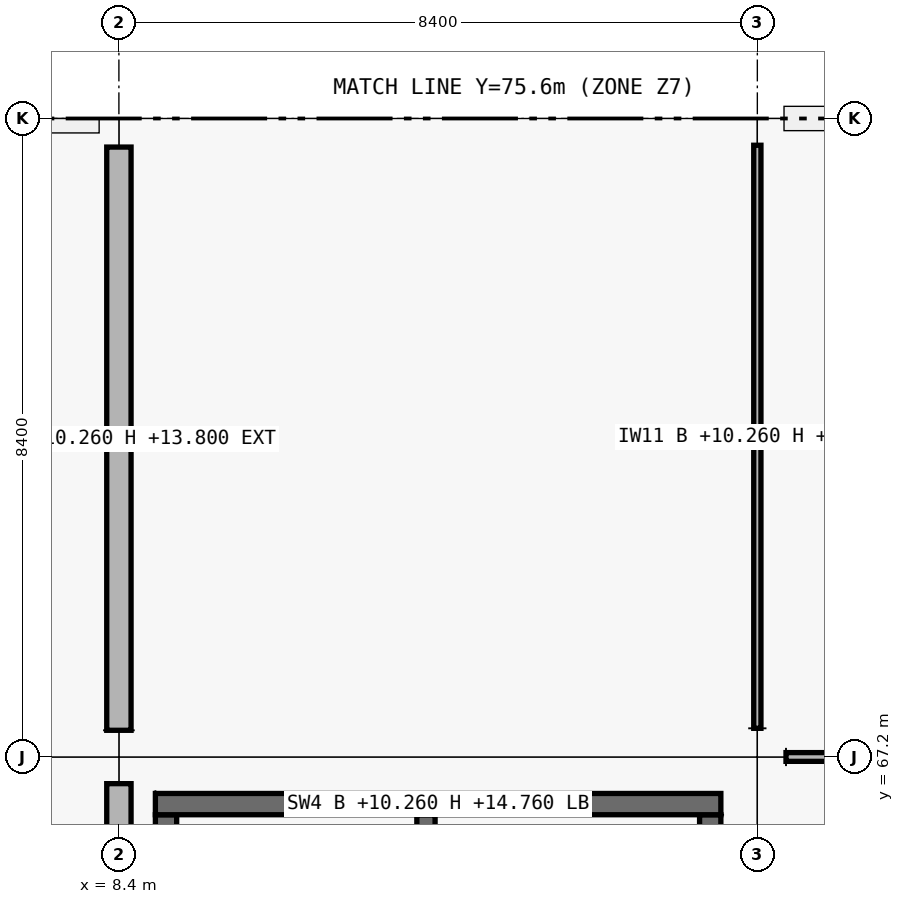
"""IFC4 building model, lengths in metres.
Left out: names, types, materials, properties, quantities, classifications, styles, units other than length and angle.
Written with IfcOpenShell. Run it as: python <this file> out.ifc"""

import sys

from ifc_helpers import new_model, si_unit, direction, frame, frame_2d, origin, origin_2d, place, context, subcontext, project, spatial, rectangle, extrude, element, fill, save


model = new_model("IFC4")
c1 = context("Model", 3, precision=1e-05, world=origin(), true_north=direction((0.0, 1.0)))
c2 = subcontext(c1, "Body", "Model", "MODEL_VIEW")
j1 = project(units=[si_unit("LENGTHUNIT", "METRE"), si_unit("PLANEANGLEUNIT", "RADIAN")], contexts=[c1])
p1 = place(None, origin())
s1 = spatial("IfcSite", under=j1, at=p1, CompositionType="ELEMENT")
p2 = place(p1, origin())
s2 = spatial("IfcBuilding", under=s1, at=p2, CompositionType="ELEMENT")
p3 = place(p2, frame((0.0, 0.0, 10.26)))
s3 = spatial("IfcBuildingStorey", under=s2, at=p3, CompositionType="ELEMENT", Elevation=10.26)
p4 = place(p3, frame((8.4, 67.2, 0.0), z_axis=(0.0, 0.0, 1.0), x_axis=(1.0, 0.0, 0.0)))
e1 = element("IfcColumn", 1, at=p4, inside=s3, PredefinedType="COLUMN", context=c2, shape_type="SweptSolid", body=[
    extrude(rectangle(XDim=0.7, YDim=0.7, at=origin_2d()), origin(), (0.0, 0.0, 1.0), 4.5),
])
for number, where, z_axis, x_axis in (
    (2, (8.4, 75.6, 0.0), (0.0, 0.0, 1.0), (1.0, 0.0, 0.0)),
    (3, (16.8, 67.2, 0.0), (0.0, 0.0, 1.0), (1.0, 0.0, 0.0)),
):
    element("IfcColumn", number, at=place(p3, frame(where, z_axis=z_axis, x_axis=x_axis)), inside=s3, PredefinedType="COLUMN", context=c2, shape_type="SweptSolid", body=[
        extrude(rectangle(XDim=0.75, YDim=0.75, at=origin_2d()), origin(), (0.0, 0.0, 1.0), 4.5),
    ])
p5 = place(p3, frame((16.8, 75.6, 0.0), z_axis=(0.0, 0.0, 1.0), x_axis=(1.0, 0.0, 0.0)))
e4 = element("IfcColumn", 4, at=p5, inside=s3, PredefinedType="COLUMN", context=c2, shape_type="SweptSolid", body=[
    extrude(rectangle(XDim=0.7, YDim=0.7, at=origin_2d()), origin(), (0.0, 0.0, 1.0), 4.5),
])
p6 = place(p3, frame((8.4, 59.176, 0.0), z_axis=(0.0, 0.0, 1.0), x_axis=(0.0, 1.0, 0.0)))
e5 = element("IfcWall", 5, at=p6, inside=s3, PredefinedType="SOLIDWALL", context=c2, shape_type="SweptSolid", body=[
    extrude(rectangle(XDim=7.673, YDim=0.32, at=frame_2d((3.836, 0.0))), origin(), (0.0, 0.0, 1.0), 3.54),
])
p7 = place(p3, frame((8.4, 67.551, 0.0), z_axis=(0.0, 0.0, 1.0), x_axis=(0.0, 1.0, 0.0)))
e6 = element("IfcWall", 6, at=p7, inside=s3, PredefinedType="SOLIDWALL", context=c2, shape_type="SweptSolid", body=[
    extrude(rectangle(XDim=7.673, YDim=0.32, at=frame_2d((3.836, 0.0))), origin(), (0.0, 0.0, 1.0), 3.54),
])
p8 = place(p7, frame((2.787, 0.0, 0.9)))
e7 = element("IfcOpeningElement", 7, at=p8, cuts=e6, PredefinedType="OPENING", context=c2, shape_type="SweptSolid", body=[
    extrude(rectangle(XDim=2.1, YDim=1.8, at=frame_2d((1.05, 0.9))), frame((0.0, 0.16, 0.0), z_axis=(0.0, -1.0, 0.0), x_axis=(1.0, 0.0, 0.0)), (0.0, 0.0, 1.0), 0.32),
])
p9 = place(p3, frame((17.151, 75.6, 0.0), z_axis=(0.0, 0.0, 1.0), x_axis=(1.0, 0.0, 0.0)))
e8 = element("IfcWall", 8, at=p9, inside=s3, PredefinedType="SOLIDWALL", context=c2, shape_type="SweptSolid", body=[
    extrude(rectangle(XDim=7.673, YDim=0.32, at=frame_2d((3.836, 0.0))), origin(), (0.0, 0.0, 1.0), 3.54),
])
p10 = place(p9, frame((2.636, 0.0, 0.9)))
e9 = element("IfcOpeningElement", 9, at=p10, cuts=e8, PredefinedType="OPENING", context=c2, shape_type="SweptSolid", body=[
    extrude(rectangle(XDim=2.4, YDim=1.8, at=frame_2d((1.2, 0.9))), frame((0.0, 0.16, 0.0), z_axis=(0.0, -1.0, 0.0), x_axis=(1.0, 0.0, 0.0)), (0.0, 0.0, 1.0), 0.32),
])
p11 = place(p3, frame((0.26, 75.505, 0.0), z_axis=(0.0, 0.0, 1.0), x_axis=(1.0, 0.0, 0.0)))
e10 = element("IfcWall", 10, at=p11, inside=s3, PredefinedType="PARAPET", context=c2, shape_type="SweptSolid", body=[
    extrude(rectangle(XDim=7.88, YDim=0.19, at=frame_2d((3.94, 0.0))), origin(), (0.0, 0.0, 1.0), 0.95),
])
p12 = place(p3, frame((9.02, 59.56, 0.0), z_axis=(0.0, 0.0, 1.0), x_axis=(0.0, 1.0, 0.0)))
e11 = element("IfcWall", 11, at=p12, inside=s3, PredefinedType="SHEAR", context=c2, shape_type="SweptSolid", body=[
    extrude(rectangle(XDim=6.88, YDim=0.28, at=frame_2d((3.44, 0.0))), origin(), (0.0, 0.0, 1.0), 4.5),
])
p13 = place(p3, frame((8.88, 66.58, 0.0), z_axis=(0.0, 0.0, 1.0), x_axis=(1.0, 0.0, 0.0)))
e12 = element("IfcWall", 12, at=p13, inside=s3, PredefinedType="SHEAR", context=c2, shape_type="SweptSolid", body=[
    extrude(rectangle(XDim=7.44, YDim=0.28, at=frame_2d((3.72, 0.0))), origin(), (0.0, 0.0, 1.0), 4.5),
])
p14 = place(p3, frame((16.18, 66.44, 0.0), z_axis=(0.0, 0.0, 1.0), x_axis=(0.0, -1.0, 0.0)))
e13 = element("IfcWall", 13, at=p14, inside=s3, PredefinedType="SHEAR", context=c2, shape_type="SweptSolid", body=[
    extrude(rectangle(XDim=6.88, YDim=0.28, at=frame_2d((3.44, 0.0))), origin(), (0.0, 0.0, 1.0), 4.5),
])
p15 = place(p3, frame((12.44, 59.56, 0.0), z_axis=(0.0, 0.0, 1.0), x_axis=(0.0, 1.0, 0.0)))
e14 = element("IfcWall", 14, at=p15, inside=s3, PredefinedType="SHEAR", context=c2, shape_type="SweptSolid", body=[
    extrude(rectangle(XDim=6.88, YDim=0.24, at=frame_2d((3.44, 0.0))), origin(), (0.0, 0.0, 1.0), 4.5),
])
p16 = place(p15, frame((0.12, 0.0, 0.0)))
e15 = element("IfcOpeningElement", 15, at=p16, cuts=e14, PredefinedType="OPENING", context=c2, shape_type="SweptSolid", body=[
    extrude(rectangle(XDim=1.0, YDim=2.15, at=frame_2d((0.5, 1.075))), frame((0.0, 0.12, 0.0), z_axis=(0.0, -1.0, 0.0), x_axis=(1.0, 0.0, 0.0)), (0.0, 0.0, 1.0), 0.24),
])
p17 = place(p3, frame((17.177, 67.2, 0.0), z_axis=(0.0, 0.0, 1.0), x_axis=(1.0, 0.0, 0.0)))
e16 = element("IfcWall", 16, at=p17, inside=s3, PredefinedType="PARTITIONING", context=c2, shape_type="SweptSolid", body=[
    extrude(rectangle(XDim=7.671, YDim=0.115, at=frame_2d((3.835, 0.0))), origin(), (0.0, 0.0, 1.0), 3.37),
])
p18 = place(p17, frame((3.316, 0.0, 0.0)))
e17 = element("IfcOpeningElement", 17, at=p18, cuts=e16, PredefinedType="OPENING", context=c2, shape_type="SweptSolid", body=[
    extrude(rectangle(XDim=1.04, YDim=2.2, at=frame_2d((0.52, 1.1))), frame((0.0, 0.058, 0.0), z_axis=(0.0, -1.0, 0.0), x_axis=(1.0, 0.0, 0.0)), (0.0, 0.0, 1.0), 0.115),
])
p19 = place(p3, frame((16.8, 67.577, 0.0), z_axis=(0.0, 0.0, 1.0), x_axis=(0.0, 1.0, 0.0)))
e18 = element("IfcWall", 18, at=p19, inside=s3, PredefinedType="PARTITIONING", context=c2, shape_type="SweptSolid", body=[
    extrude(rectangle(XDim=7.671, YDim=0.095, at=frame_2d((3.835, 0.0))), origin(), (0.0, 0.0, 1.0), 3.37),
])
p20 = place(p19, frame((3.311, 0.0, 0.0)))
e19 = element("IfcOpeningElement", 19, at=p20, cuts=e18, PredefinedType="OPENING", context=c2, shape_type="SweptSolid", body=[
    extrude(rectangle(XDim=1.05, YDim=2.12, at=frame_2d((0.525, 1.06))), frame((0.0, 0.047, 0.0), z_axis=(0.0, -1.0, 0.0), x_axis=(1.0, 0.0, 0.0)), (0.0, 0.0, 1.0), 0.095),
])
p21 = place(p8, origin())
e20 = element("IfcWindow", 20, at=p21, inside=s3, PartitioningType="SINGLE_PANEL", PredefinedType="WINDOW", context=c2, shape_type="SweptSolid", body=[
    extrude(rectangle(XDim=2.1, YDim=1.8, at=frame_2d((1.05, 0.9))), frame((0.0, 0.03, 0.0), z_axis=(0.0, -1.0, 0.0), x_axis=(1.0, 0.0, 0.0)), (0.0, 0.0, 1.0), 0.06),
])
fill(e7, e20)
p22 = place(p20, origin())
e21 = element("IfcDoor", 21, at=p22, inside=s3, OperationType="SINGLE_SWING_LEFT", PredefinedType="DOOR", context=c2, shape_type="SweptSolid", body=[
    extrude(rectangle(XDim=1.05, YDim=2.12, at=frame_2d((0.525, 1.06))), frame((0.0, 0.025, 0.0), z_axis=(0.0, -1.0, 0.0), x_axis=(1.0, 0.0, 0.0)), (0.0, 0.0, 1.0), 0.05),
])
fill(e19, e21)
save(model, sys.argv[1])
